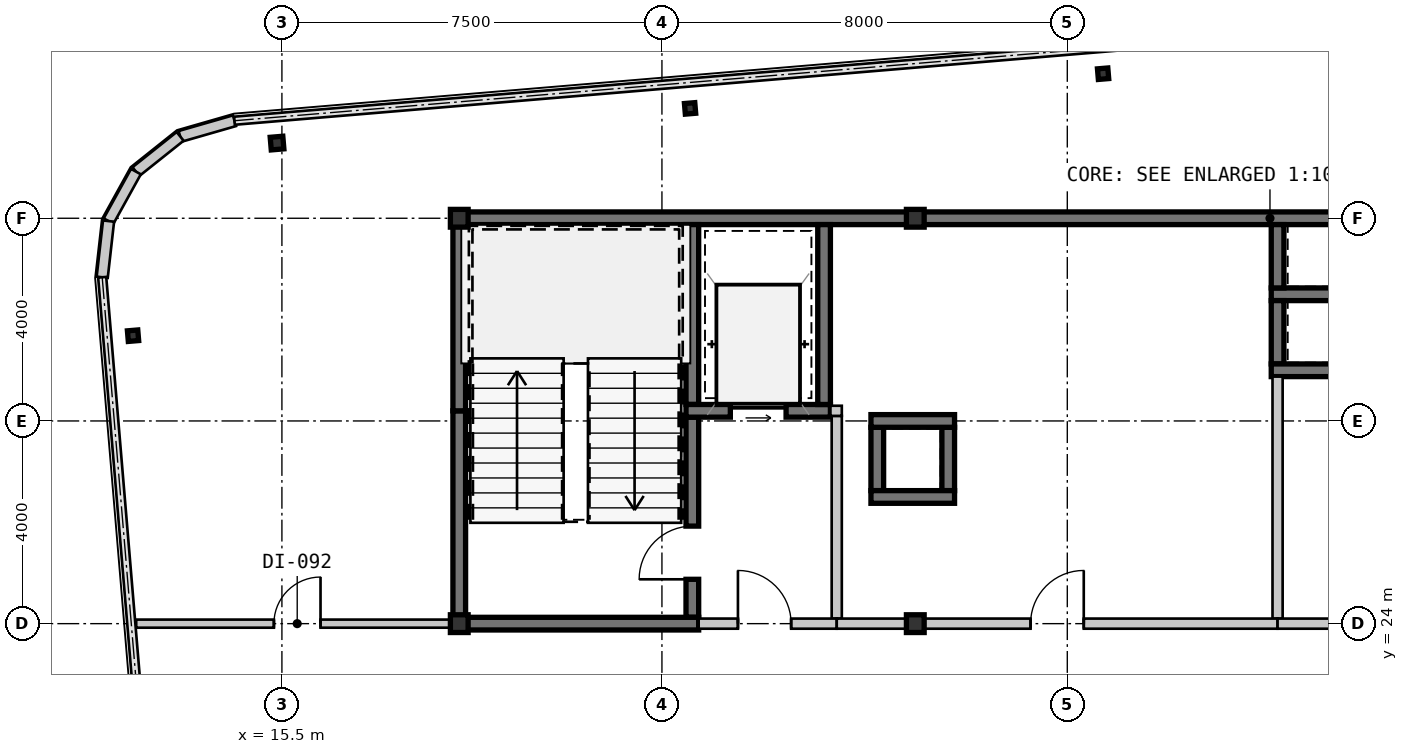
"""IFC4 building model, lengths in metres.
Left out: names, types, materials, properties, quantities, classifications, styles, units other than length and angle.
Written with IfcOpenShell. Run it as: python <this file> out.ifc"""

import sys

from ifc_helpers import new_model, si_unit, direction, frame, frame_2d, origin, origin_2d, place, context, subcontext, project, spatial, rectangle, hollow_rectangle, i_section, extrude, source, transform, mapped, element, fill, save


model = new_model("IFC4")
c1 = context("Model", 3, precision=1e-05, world=origin(), true_north=direction((0.0, 1.0)))
c2 = subcontext(c1, "Body", "Model", "MODEL_VIEW")
j1 = project(units=[si_unit("LENGTHUNIT", "METRE"), si_unit("PLANEANGLEUNIT", "RADIAN")], contexts=[c1])
p1 = place(None, origin())
s1 = spatial("IfcSite", under=j1, at=p1, CompositionType="ELEMENT")
p2 = place(p1, origin())
s2 = spatial("IfcBuilding", under=s1, at=p2, CompositionType="ELEMENT")
p3 = place(p2, frame((0.0, 0.0, 185.15)))
s3 = spatial("IfcBuildingStorey", under=s2, at=p3, CompositionType="ELEMENT", Elevation=185.15)
m1 = source(origin(), c2, "Body", "SweptSolid", [
    extrude(hollow_rectangle(XDim=0.35, YDim=0.35, WallThickness=0.016, at=origin_2d()), origin(), (0.0, 0.0, 1.0), 3.15),
])
for number, where, z_axis, x_axis in (
    (1, (19.0, 24.0, 0.0), (0.0, 0.0, 1.0), (1.0, 0.0, 0.0)),
    (2, (28.0, 24.0, 0.0), (0.0, 0.0, 1.0), (1.0, 0.0, 0.0)),
    (3, (19.0, 32.0, 0.0), (0.0, 0.0, 1.0), (1.0, 0.0, 0.0)),
    (4, (28.0, 32.0, 0.0), (0.0, 0.0, 1.0), (1.0, 0.0, 0.0)),
):
    element("IfcColumn", number, at=place(p3, frame(where, z_axis=z_axis, x_axis=x_axis)), inside=s3, PredefinedType="COLUMN", context=c2, shape_type="MappedRepresentation", body=[
        mapped(m1, transform((0.0, 0.0, 0.0), scale=1.0)),
    ])
m2 = source(origin(), c2, "Body", "SweptSolid", [
    extrude(hollow_rectangle(XDim=0.25, YDim=0.25, WallThickness=0.01, at=origin_2d()), origin(), (0.0, 0.0, 1.0), 3.15),
])
p4 = place(p3, frame((15.404, 33.484, 0.0), z_axis=(0.0, 0.0, 1.0), x_axis=(0.99649285925, 0.083677843332, 0.0)))
e5 = element("IfcColumn", 5, at=p4, inside=s3, PredefinedType="COLUMN", context=c2, shape_type="MappedRepresentation", body=[
    mapped(m2, transform((0.0, 0.0, 0.0), scale=1.0)),
])
m3 = source(origin(), c2, "Body", "SweptSolid", [
    extrude(i_section(OverallWidth=0.205, OverallDepth=0.21, WebThickness=0.009, FlangeThickness=0.014, at=origin_2d()), origin(), (0.0, 0.0, 1.0), 3.15),
])
for number, where, z_axis, x_axis in (
    (6, (23.555, 34.168, 0.0), (0.0, 0.0, 1.0), (0.996, 0.084, 0.0)),
    (7, (31.706, 34.853, 0.0), (0.0, 0.0, 1.0), (0.996, 0.084, 0.0)),
    (8, (12.562, 29.682, 0.0), (0.0, 0.0, 1.0), (0.996, 0.084, 0.0)),
):
    element("IfcColumn", number, at=place(p3, frame(where, z_axis=z_axis, x_axis=x_axis)), inside=s3, PredefinedType="COLUMN", context=c2, shape_type="MappedRepresentation", body=[
        mapped(m3, transform((0.0, 0.0, 0.0), scale=1.0)),
    ])
m4 = source(origin(), c2, "Body", "SweptSolid", [
    extrude(rectangle(XDim=1.116, YDim=0.22, at=frame_2d((0.558, 0.0))), origin(), (0.0, 0.0, 1.0), 2.93),
])
p5 = place(p3, frame((14.564, 33.925, 0.0), z_axis=(0.0, 0.0, 1.0), x_axis=(-0.961010464297, -0.276512002475, 0.0)))
e9 = element("IfcWall", 9, at=p5, inside=s3, PredefinedType="SOLIDWALL", context=c2, shape_type="MappedRepresentation", body=[
    mapped(m4, transform((0.0, 0.0, 0.0), scale=1.0)),
])
m5 = source(origin(), c2, "Body", "SweptSolid", [
    extrude(rectangle(XDim=1.116, YDim=0.22, at=frame_2d((0.558, 0.0))), origin(), (0.0, 0.0, 1.0), 2.93),
])
p6 = place(p3, frame((13.491, 33.616, 0.0), z_axis=(0.0, 0.0, 1.0), x_axis=(-0.782062884215, -0.623199522732, 0.0)))
e10 = element("IfcWall", 10, at=p6, inside=s3, PredefinedType="SOLIDWALL", context=c2, shape_type="MappedRepresentation", body=[
    mapped(m5, transform((0.0, 0.0, 0.0), scale=1.0)),
])
for number, where, z_axis, x_axis in (
    (11, (12.619, 32.921, 0.0), (0.0, 0.0, 1.0), (-0.484, -0.875, 0.0)),
    (12, (12.079, 31.944, 0.0), (0.0, 0.0, 1.0), (-0.112, -0.994, 0.0)),
):
    element("IfcWall", number, at=place(p3, frame(where, z_axis=z_axis, x_axis=x_axis)), inside=s3, PredefinedType="SOLIDWALL", context=c2, shape_type="MappedRepresentation", body=[
        mapped(m4, transform((0.0, 0.0, 0.0), scale=1.0)),
    ])
m6 = source(origin(), c2, "Body", "SweptSolid", [
    extrude(rectangle(XDim=9.125, YDim=0.25, at=frame_2d((4.562, 0.0))), origin(), (0.0, 0.0, 1.0), 2.93),
])
p7 = place(p3, frame((18.875, 32.0, 0.0), z_axis=(0.0, 0.0, 1.0), x_axis=(1.0, 0.0, 0.0)))
e13 = element("IfcWall", 13, at=p7, inside=s3, PredefinedType="SHEAR", context=c2, shape_type="MappedRepresentation", body=[
    mapped(m6, transform((0.0, 0.0, 0.0), scale=1.0)),
])
m7 = source(origin(), c2, "Body", "SweptSolid", [
    extrude(rectangle(XDim=11.2, YDim=0.25, at=frame_2d((5.6, 0.0))), origin(), (0.0, 0.0, 1.0), 2.93),
])
p8 = place(p3, frame((28.0, 32.0, 0.0), z_axis=(0.0, 0.0, 1.0), x_axis=(1.0, 0.0, 0.0)))
e14 = element("IfcWall", 14, at=p8, inside=s3, PredefinedType="SHEAR", context=c2, shape_type="MappedRepresentation", body=[
    mapped(m7, transform((0.0, 0.0, 0.0), scale=1.0)),
])
m8 = source(origin(), c2, "Body", "SweptSolid", [
    extrude(rectangle(XDim=4.075, YDim=0.25, at=frame_2d((2.038, 0.0))), origin(), (0.0, 0.0, 1.0), 2.93),
])
p9 = place(p3, frame((19.0, 24.125, 0.0), z_axis=(0.0, 0.0, 1.0), x_axis=(0.0, 1.0, 0.0)))
e15 = element("IfcWall", 15, at=p9, inside=s3, PredefinedType="SHEAR", context=c2, shape_type="MappedRepresentation", body=[
    mapped(m8, transform((0.0, 0.0, 0.0), scale=1.0)),
])
m9 = source(origin(), c2, "Body", "SweptSolid", [
    extrude(rectangle(XDim=3.675, YDim=0.25, at=frame_2d((1.837, 0.0))), origin(), (0.0, 0.0, 1.0), 2.93),
])
p10 = place(p3, frame((19.0, 28.2, 0.0), z_axis=(0.0, 0.0, 1.0), x_axis=(0.0, 1.0, 0.0)))
e16 = element("IfcWall", 16, at=p10, inside=s3, PredefinedType="SHEAR", context=c2, shape_type="MappedRepresentation", body=[
    mapped(m9, transform((0.0, 0.0, 0.0), scale=1.0)),
])
m10 = source(origin(), c2, "Body", "SweptSolid", [
    extrude(rectangle(XDim=3.55, YDim=0.25, at=frame_2d((1.775, 0.0))), origin(), (0.0, 0.0, 1.0), 2.93),
])
p11 = place(p3, frame((23.6, 28.325, 0.0), z_axis=(0.0, 0.0, 1.0), x_axis=(0.0, 1.0, 0.0)))
e17 = element("IfcWall", 17, at=p11, inside=s3, PredefinedType="SHEAR", context=c2, shape_type="MappedRepresentation", body=[
    mapped(m10, transform((0.0, 0.0, 0.0), scale=1.0)),
])
m11 = source(origin(), c2, "Body", "SweptSolid", [
    extrude(rectangle(XDim=3.95, YDim=0.25, at=frame_2d((1.975, 0.0))), origin(), (0.0, 0.0, 1.0), 2.93),
])
p12 = place(p3, frame((23.6, 24.125, 0.0), z_axis=(0.0, 0.0, 1.0), x_axis=(0.0, 1.0, 0.0)))
e18 = element("IfcWall", 18, at=p12, inside=s3, PredefinedType="SHEAR", context=c2, shape_type="MappedRepresentation", body=[
    mapped(m11, transform((0.0, 0.0, 0.0), scale=1.0)),
])
m12 = source(origin(), c2, "Body", "SweptSolid", [
    extrude(rectangle(XDim=1.05, YDim=2.1, at=frame_2d((0.525, 1.05))), frame((0.0, 0.135, 0.0), z_axis=(0.0, -1.0, 0.0), x_axis=(1.0, 0.0, 0.0)), (0.0, 0.0, 1.0), 0.27),
])
p13 = place(p12, frame((0.75, 0.0, 0.0)))
e19 = element("IfcOpeningElement", 19, at=p13, cuts=e18, PredefinedType="OPENING", context=c2, shape_type="MappedRepresentation", body=[
    mapped(m12, transform((0.0, 0.0, 0.0), scale=1.0)),
])
m13 = source(origin(), c2, "Body", "SweptSolid", [
    extrude(rectangle(XDim=4.85, YDim=0.25, at=frame_2d((2.425, 0.0))), origin(), (0.0, 0.0, 1.0), 2.93),
])
p14 = place(p3, frame((18.875, 24.0, 0.0), z_axis=(0.0, 0.0, 1.0), x_axis=(1.0, 0.0, 0.0)))
e20 = element("IfcWall", 20, at=p14, inside=s3, PredefinedType="SHEAR", context=c2, shape_type="MappedRepresentation", body=[
    mapped(m13, transform((0.0, 0.0, 0.0), scale=1.0)),
])
m14 = source(origin(), c2, "Body", "SweptSolid", [
    extrude(rectangle(XDim=2.85, YDim=0.25, at=frame_2d((1.425, 0.0))), origin(), (0.0, 0.0, 1.0), 2.93),
])
p15 = place(p3, frame((23.475, 28.2, 0.0), z_axis=(0.0, 0.0, 1.0), x_axis=(1.0, 0.0, 0.0)))
e21 = element("IfcWall", 21, at=p15, inside=s3, PredefinedType="SHEAR", context=c2, shape_type="MappedRepresentation", body=[
    mapped(m14, transform((0.0, 0.0, 0.0), scale=1.0)),
])
m15 = source(origin(), c2, "Body", "SweptSolid", [
    extrude(rectangle(XDim=1.1, YDim=2.15, at=frame_2d((0.55, 1.075))), frame((0.0, 0.135, 0.0), z_axis=(0.0, -1.0, 0.0), x_axis=(1.0, 0.0, 0.0)), (0.0, 0.0, 1.0), 0.27),
])
p16 = place(p15, frame((0.875, 0.0, 0.0)))
e22 = element("IfcOpeningElement", 22, at=p16, cuts=e21, PredefinedType="OPENING", context=c2, shape_type="MappedRepresentation", body=[
    mapped(m15, transform((0.0, 0.0, 0.0), scale=1.0)),
])
p17 = place(p3, frame((26.2, 28.325, 0.0), z_axis=(0.0, 0.0, 1.0), x_axis=(0.0, 1.0, 0.0)))
e23 = element("IfcWall", 23, at=p17, inside=s3, PredefinedType="SHEAR", context=c2, shape_type="MappedRepresentation", body=[
    mapped(m10, transform((0.0, 0.0, 0.0), scale=1.0)),
])
m16 = source(origin(), c2, "Body", "SweptSolid", [
    extrude(rectangle(XDim=4.0, YDim=0.2, at=frame_2d((2.0, 0.0))), origin(), (0.0, 0.0, 1.0), 2.93),
])
p18 = place(p3, frame((26.45, 24.1, 0.0), z_axis=(0.0, 0.0, 1.0), x_axis=(0.0, 1.0, 0.0)))
e24 = element("IfcWall", 24, at=p18, inside=s3, PredefinedType="SOLIDWALL", context=c2, shape_type="MappedRepresentation", body=[
    mapped(m16, transform((0.0, 0.0, 0.0), scale=1.0)),
])
m17 = source(origin(), c2, "Body", "SweptSolid", [
    extrude(rectangle(XDim=2.725, YDim=0.2, at=frame_2d((1.362, 0.0))), origin(), (0.0, 0.0, 1.0), 2.47),
])
p19 = place(p3, frame((23.725, 24.0, 0.0), z_axis=(0.0, 0.0, 1.0), x_axis=(1.0, 0.0, 0.0)))
e25 = element("IfcWall", 25, at=p19, inside=s3, PredefinedType="SOLIDWALL", context=c2, shape_type="MappedRepresentation", body=[
    mapped(m17, transform((0.0, 0.0, 0.0), scale=1.0)),
])
m18 = source(origin(), c2, "Body", "SweptSolid", [
    extrude(rectangle(XDim=1.05, YDim=2.1, at=frame_2d((0.525, 1.05))), frame((0.0, 0.11, 0.0), z_axis=(0.0, -1.0, 0.0), x_axis=(1.0, 0.0, 0.0)), (0.0, 0.0, 1.0), 0.22),
])
p20 = place(p19, frame((0.775, 0.0, 0.0)))
e26 = element("IfcOpeningElement", 26, at=p20, cuts=e25, PredefinedType="OPENING", context=c2, shape_type="MappedRepresentation", body=[
    mapped(m18, transform((0.0, 0.0, 0.0), scale=1.0)),
])
m19 = source(origin(), c2, "Body", "SweptSolid", [
    extrude(rectangle(XDim=1.95, YDim=0.25, at=frame_2d((0.975, 0.0))), origin(), (0.0, 0.0, 1.0), 2.93),
])
p21 = place(p3, frame((35.025, 30.5, 0.0), z_axis=(0.0, 0.0, 1.0), x_axis=(1.0, 0.0, 0.0)))
e27 = element("IfcWall", 27, at=p21, inside=s3, PredefinedType="SHEAR", context=c2, shape_type="MappedRepresentation", body=[
    mapped(m19, transform((0.0, 0.0, 0.0), scale=1.0)),
])
m20 = source(origin(), c2, "Body", "SweptSolid", [
    extrude(rectangle(XDim=1.25, YDim=0.25, at=frame_2d((0.625, 0.0))), origin(), (0.0, 0.0, 1.0), 2.93),
])
for number, where, z_axis, x_axis in (
    (28, (35.15, 31.875, 0.0), (0.0, 0.0, 1.0), (0.0, -1.0, 0.0)),
    (29, (35.15, 30.375, 0.0), (0.0, 0.0, 1.0), (0.0, -1.0, 0.0)),
):
    element("IfcWall", number, at=place(p3, frame(where, z_axis=z_axis, x_axis=x_axis)), inside=s3, PredefinedType="SHEAR", context=c2, shape_type="MappedRepresentation", body=[
        mapped(m20, transform((0.0, 0.0, 0.0), scale=1.0)),
    ])
p22 = place(p3, frame((35.025, 29.0, 0.0), z_axis=(0.0, 0.0, 1.0), x_axis=(1.0, 0.0, 0.0)))
e30 = element("IfcWall", 30, at=p22, inside=s3, PredefinedType="SHEAR", context=c2, shape_type="MappedRepresentation", body=[
    mapped(m19, transform((0.0, 0.0, 0.0), scale=1.0)),
])
for number, where, z_axis, x_axis in (
    (31, (28.65, 26.625, 0.0), (0.0, 0.0, 1.0), (0.0, 1.0, 0.0)),
    (32, (27.25, 27.875, 0.0), (0.0, 0.0, 1.0), (0.0, -1.0, 0.0)),
):
    element("IfcWall", number, at=place(p3, frame(where, z_axis=z_axis, x_axis=x_axis)), inside=s3, PredefinedType="SHEAR", context=c2, shape_type="MappedRepresentation", body=[
        mapped(m20, transform((0.0, 0.0, 0.0), scale=1.0)),
    ])
m21 = source(origin(), c2, "Body", "SweptSolid", [
    extrude(rectangle(XDim=1.65, YDim=0.25, at=frame_2d((0.825, 0.0))), origin(), (0.0, 0.0, 1.0), 2.93),
])
for number, where, z_axis, x_axis in (
    (33, (28.775, 28.0, 0.0), (0.0, 0.0, 1.0), (-1.0, 0.0, 0.0)),
    (34, (27.125, 26.5, 0.0), (0.0, 0.0, 1.0), (1.0, 0.0, 0.0)),
):
    element("IfcWall", number, at=place(p3, frame(where, z_axis=z_axis, x_axis=x_axis)), inside=s3, PredefinedType="SHEAR", context=c2, shape_type="MappedRepresentation", body=[
        mapped(m21, transform((0.0, 0.0, 0.0), scale=1.0)),
    ])
m22 = source(origin(), c2, "Body", "SweptSolid", [
    extrude(rectangle(XDim=4.775, YDim=0.2, at=frame_2d((2.387, 0.0))), origin(), (0.0, 0.0, 1.0), 2.93),
])
p23 = place(p3, frame((35.15, 28.875, 0.0), z_axis=(0.0, 0.0, 1.0), x_axis=(0.0, -1.0, 0.0)))
e35 = element("IfcWall", 35, at=p23, inside=s3, PredefinedType="SOLIDWALL", context=c2, shape_type="MappedRepresentation", body=[
    mapped(m22, transform((0.0, 0.0, 0.0), scale=1.0)),
])
m23 = source(origin(), c2, "Body", "SweptSolid", [
    extrude(rectangle(XDim=8.7, YDim=0.2, at=frame_2d((4.35, 0.0))), origin(), (0.0, 0.0, 1.0), 2.47),
])
p24 = place(p3, frame((35.15, 24.0, 0.0), z_axis=(0.0, 0.0, 1.0), x_axis=(-1.0, 0.0, 0.0)))
e36 = element("IfcWall", 36, at=p24, inside=s3, PredefinedType="SOLIDWALL", context=c2, shape_type="MappedRepresentation", body=[
    mapped(m23, transform((0.0, 0.0, 0.0), scale=1.0)),
])
p25 = place(p24, frame((3.825, 0.0, 0.0)))
e37 = element("IfcOpeningElement", 37, at=p25, cuts=e36, PredefinedType="OPENING", context=c2, shape_type="MappedRepresentation", body=[
    mapped(m18, transform((0.0, 0.0, 0.0), scale=1.0)),
])
m24 = source(origin(), c2, "Body", "SweptSolid", [
    extrude(rectangle(XDim=4.05, YDim=0.2, at=frame_2d((2.025, 0.0))), origin(), (0.0, 0.0, 1.0), 2.47),
])
p26 = place(p3, frame((39.2, 24.0, 0.0), z_axis=(0.0, 0.0, 1.0), x_axis=(-1.0, 0.0, 0.0)))
e38 = element("IfcWall", 38, at=p26, inside=s3, PredefinedType="SOLIDWALL", context=c2, shape_type="MappedRepresentation", body=[
    mapped(m24, transform((0.0, 0.0, 0.0), scale=1.0)),
])
p27 = place(p26, frame((1.5, 0.0, 0.0)))
e39 = element("IfcOpeningElement", 39, at=p27, cuts=e38, PredefinedType="OPENING", context=c2, shape_type="MappedRepresentation", body=[
    mapped(m18, transform((0.0, 0.0, 0.0), scale=1.0)),
])
m25 = source(origin(), c2, "Body", "SweptSolid", [
    extrude(rectangle(XDim=6.251, YDim=0.16, at=frame_2d((3.125, 0.0))), origin(), (0.0, 0.0, 1.0), 2.93),
])
p28 = place(p3, frame((12.624, 24.0, 0.0), z_axis=(0.0, 0.0, 1.0), x_axis=(1.0, 0.0, 0.0)))
e40 = element("IfcWall", 40, at=p28, inside=s3, PredefinedType="PARTITIONING", context=c2, shape_type="MappedRepresentation", body=[
    mapped(m25, transform((0.0, 0.0, 0.0), scale=1.0)),
])
m26 = source(origin(), c2, "Body", "SweptSolid", [
    extrude(rectangle(XDim=0.92, YDim=2.1, at=frame_2d((0.46, 1.05))), frame((0.0, 0.09, 0.0), z_axis=(0.0, -1.0, 0.0), x_axis=(1.0, 0.0, 0.0)), (0.0, 0.0, 1.0), 0.18),
])
p29 = place(p28, frame((2.718, 0.0, 0.0)))
e41 = element("IfcOpeningElement", 41, at=p29, cuts=e40, PredefinedType="OPENING", context=c2, shape_type="MappedRepresentation", body=[
    mapped(m26, transform((0.0, 0.0, 0.0), scale=1.0)),
])
m27 = source(origin(), c2, "Body", "SweptSolid", [
    extrude(rectangle(XDim=0.225, YDim=0.2, at=frame_2d((0.113, 0.0))), origin(), (0.0, 0.0, 1.0), 2.93),
])
p30 = place(p3, frame((26.325, 28.2, 0.0), z_axis=(0.0, 0.0, 1.0), x_axis=(1.0, 0.0, 0.0)))
e42 = element("IfcWall", 42, at=p30, inside=s3, PredefinedType="SOLIDWALL", context=c2, shape_type="MappedRepresentation", body=[
    mapped(m27, transform((0.0, 0.0, 0.0), scale=1.0)),
])
m28 = source(origin(), c2, "Body", "SweptSolid", [
    extrude(rectangle(XDim=1.05, YDim=2.1, at=frame_2d((0.525, 1.05))), frame((0.0, 0.025, 0.0), z_axis=(0.0, -1.0, 0.0), x_axis=(1.0, 0.0, 0.0)), (0.0, 0.0, 1.0), 0.05),
])
p31 = place(p13, origin())
e43 = element("IfcDoor", 43, at=p31, inside=s3, OperationType="SINGLE_SWING_LEFT", PredefinedType="DOOR", context=c2, shape_type="MappedRepresentation", body=[
    mapped(m28, transform((0.0, 0.0, 0.0), scale=1.0)),
])
fill(e19, e43)
m29 = source(origin(), c2, "Body", "SweptSolid", [
    extrude(rectangle(XDim=1.1, YDim=2.15, at=frame_2d((0.55, 1.075))), frame((0.0, 0.025, 0.0), z_axis=(0.0, -1.0, 0.0), x_axis=(1.0, 0.0, 0.0)), (0.0, 0.0, 1.0), 0.05),
])
p32 = place(p16, origin())
e44 = element("IfcDoor", 44, at=p32, inside=s3, OperationType="SLIDING_TO_LEFT", PredefinedType="DOOR", context=c2, shape_type="MappedRepresentation", body=[
    mapped(m29, transform((0.0, 0.0, 0.0), scale=1.0)),
])
fill(e22, e44)
p33 = place(p20, origin())
e45 = element("IfcDoor", 45, at=p33, inside=s3, OperationType="SINGLE_SWING_LEFT", PredefinedType="DOOR", context=c2, shape_type="MappedRepresentation", body=[
    mapped(m28, transform((0.0, 0.0, 0.0), scale=1.0)),
])
fill(e26, e45)
p34 = place(p25, frame((1.05, 0.0, 0.0), z_axis=(0.0, 0.0, 1.0), x_axis=(-1.0, 0.0, 0.0)))
e46 = element("IfcDoor", 46, at=p34, inside=s3, OperationType="SINGLE_SWING_RIGHT", PredefinedType="DOOR", context=c2, shape_type="MappedRepresentation", body=[
    mapped(m28, transform((0.0, 0.0, 0.0), scale=1.0)),
])
fill(e37, e46)
m30 = source(origin(), c2, "Body", "SweptSolid", [
    extrude(rectangle(XDim=0.92, YDim=2.1, at=frame_2d((0.46, 1.05))), frame((0.0, 0.025, 0.0), z_axis=(0.0, -1.0, 0.0), x_axis=(1.0, 0.0, 0.0)), (0.0, 0.0, 1.0), 0.05),
])
p35 = place(p29, origin())
e47 = element("IfcDoor", 47, at=p35, inside=s3, OperationType="SINGLE_SWING_RIGHT", PredefinedType="DOOR", context=c2, shape_type="MappedRepresentation", body=[
    mapped(m30, transform((0.0, 0.0, 0.0), scale=1.0)),
])
fill(e41, e47)
save(model, sys.argv[1])
